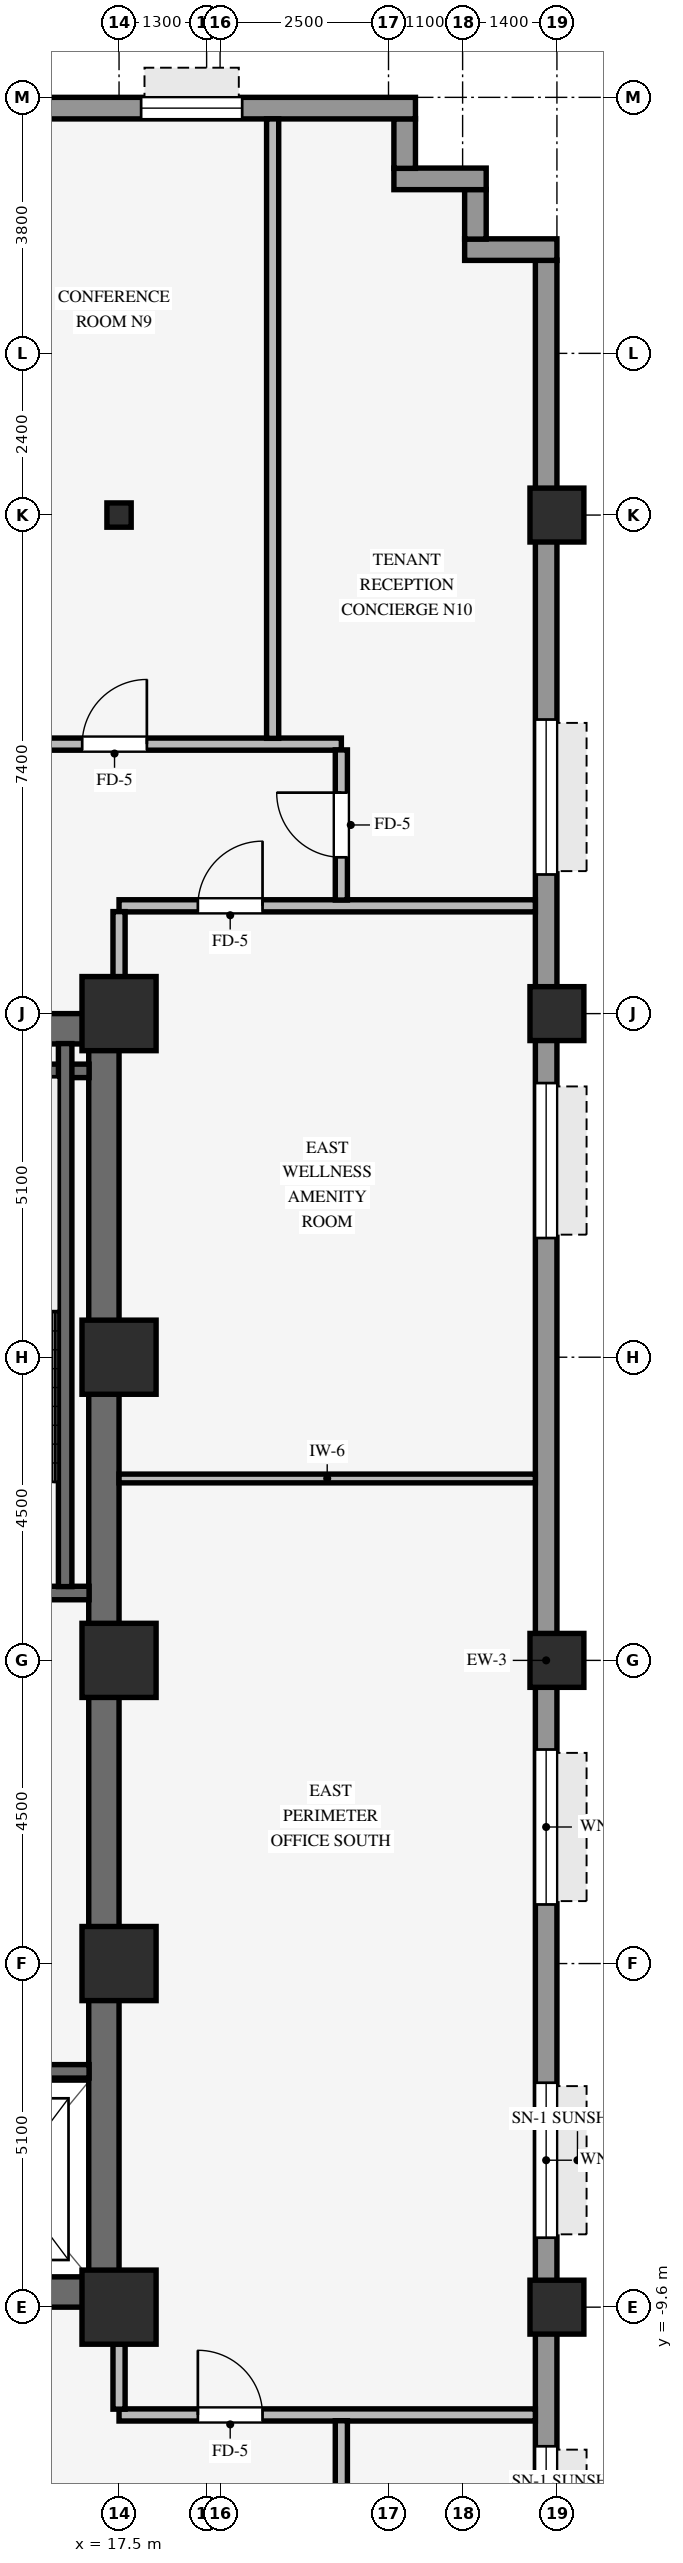
"""IFC4 building model, lengths in metres.
Left out: names, types, materials, properties, quantities, classifications, styles, units other than length and angle.
Written with IfcOpenShell. Run it as: python <this file> out.ifc"""

import sys

from ifc_helpers import new_model, si_unit, direction, frame, frame_2d, origin, origin_2d, place, context, subcontext, project, spatial, rectangle, hollow_rectangle, i_section, extrude, source, transform, mapped, element, fill, save


model = new_model("IFC4")
c1 = context("Model", 3, precision=1e-05, world=origin(), true_north=direction((0.0, 1.0)))
c2 = subcontext(c1, "Body", "Model", "MODEL_VIEW")
j1 = project(units=[si_unit("LENGTHUNIT", "METRE"), si_unit("PLANEANGLEUNIT", "RADIAN")], contexts=[c1])
p1 = place(None, origin())
s1 = spatial("IfcSite", under=j1, at=p1, CompositionType="ELEMENT")
p2 = place(p1, origin())
s2 = spatial("IfcBuilding", under=s1, at=p2, CompositionType="ELEMENT")
p3 = place(p2, frame((0.0, 0.0, 89.65)))
s3 = spatial("IfcBuildingStorey", under=s2, at=p3, CompositionType="ELEMENT", Elevation=89.65)
for number, where, z_axis, x_axis in (
    (1, (9.0, -9.375, 0.0), (0.0, 0.0, 1.0), (1.0, 0.0, 0.0)),
    (2, (9.0, 9.375, 0.0), (0.0, 0.0, 1.0), (1.0, 0.0, 0.0)),
):
    element("IfcWall", number, at=place(p3, frame(where, z_axis=z_axis, x_axis=x_axis)), inside=s3, PredefinedType="SHEAR", context=c2, shape_type="SweptSolid", body=[
        extrude(rectangle(XDim=8.5, YDim=0.45, at=frame_2d((4.25, 0.0))), origin(), (0.0, 0.0, 1.0), 3.25),
    ])
p4 = place(p3, frame((17.275, -9.155, 0.0), z_axis=(0.0, 0.0, 1.0), x_axis=(0.0, 1.0, 0.0)))
e3 = element("IfcWall", 3, at=p4, inside=s3, PredefinedType="SHEAR", context=c2, shape_type="SweptSolid", body=[
    extrude(rectangle(XDim=18.31, YDim=0.45, at=frame_2d((9.155, 0.0))), origin(), (0.0, 0.0, 1.0), 3.25),
])
for number, where, z_axis, x_axis in (
    (4, (17.5, -9.6, 0.0), (0.0, 0.0, 1.0), (1.0, 0.0, 0.0)),
    (5, (17.5, -4.5, 0.0), (0.0, 0.0, 1.0), (1.0, 0.0, 0.0)),
    (6, (17.5, 4.5, 0.0), (0.0, 0.0, 1.0), (1.0, 0.0, 0.0)),
    (7, (17.5, 9.6, 0.0), (0.0, 0.0, 1.0), (1.0, 0.0, 0.0)),
    (8, (17.5, 0.0, 0.0), (0.0, 0.0, 1.0), (1.0, 0.0, 0.0)),
):
    element("IfcColumn", number, at=place(p3, frame(where, z_axis=z_axis, x_axis=x_axis)), inside=s3, PredefinedType="COLUMN", context=c2, shape_type="SweptSolid", body=[
        extrude(rectangle(XDim=1.1, YDim=1.1, at=origin_2d()), origin(), (0.0, 0.0, 1.0), 3.25),
    ])
for number, where, z_axis, x_axis in (
    (9, (24.0, -9.6, 0.0), (0.0, 0.0, 1.0), (1.0, 0.0, 0.0)),
    (10, (24.0, 0.0, 0.0), (0.0, 0.0, 1.0), (1.0, 0.0, 0.0)),
    (11, (24.0, 9.6, 0.0), (0.0, 0.0, 1.0), (1.0, 0.0, 0.0)),
    (12, (24.0, 17.0, 0.0), (0.0, 0.0, 1.0), (1.0, 0.0, 0.0)),
):
    element("IfcColumn", number, at=place(p3, frame(where, z_axis=z_axis, x_axis=x_axis)), inside=s3, PredefinedType="COLUMN", context=c2, shape_type="SweptSolid", body=[
        extrude(hollow_rectangle(XDim=0.8, YDim=0.8, WallThickness=0.055, InnerFilletRadius=0.055, OuterFilletRadius=0.11, at=origin_2d()), origin(), (0.0, 0.0, 1.0), 3.25),
    ])
p5 = place(p3, frame((17.5, 17.0, 0.0), z_axis=(0.0, 0.0, 1.0), x_axis=(1.0, 0.0, 0.0)))
e13 = element("IfcColumn", 13, at=p5, inside=s3, PredefinedType="COLUMN", context=c2, shape_type="SweptSolid", body=[
    extrude(i_section(OverallWidth=0.36, OverallDepth=0.36, WebThickness=0.021, FlangeThickness=0.021, FilletRadius=0.018, at=origin_2d()), origin(), (0.0, 0.0, 1.0), 3.25),
])
p6 = place(p3, frame((23.84, -20.784, 0.0), z_axis=(0.0, 0.0, 1.0), x_axis=(0.0, 1.0, 0.0)))
e14 = element("IfcWall", 14, at=p6, inside=s3, PredefinedType="STANDARD", context=c2, shape_type="SweptSolid", body=[
    extrude(rectangle(XDim=41.568, YDim=0.32, at=frame_2d((20.784, 0.0))), origin(), (0.0, 0.0, 1.0), 2.585),
])
p7 = place(p6, frame((6.819, 0.0, 0.8)))
e15 = element("IfcOpeningElement", 15, at=p7, cuts=e14, PredefinedType="OPENING", context=c2, shape_type="SweptSolid", body=[
    extrude(rectangle(XDim=2.3, YDim=1.62, at=frame_2d((1.15, 0.81))), frame((0.0, 0.17, 0.0), z_axis=(0.0, -1.0, 0.0), x_axis=(1.0, 0.0, 0.0)), (0.0, 0.0, 1.0), 0.34),
])
p8 = place(p6, frame((12.215, 0.0, 0.8)))
e16 = element("IfcOpeningElement", 16, at=p8, cuts=e14, PredefinedType="OPENING", context=c2, shape_type="SweptSolid", body=[
    extrude(rectangle(XDim=2.3, YDim=1.62, at=frame_2d((1.15, 0.81))), frame((0.0, 0.17, 0.0), z_axis=(0.0, -1.0, 0.0), x_axis=(1.0, 0.0, 0.0)), (0.0, 0.0, 1.0), 0.34),
])
p9 = place(p6, frame((17.161, 0.0, 0.8)))
e17 = element("IfcOpeningElement", 17, at=p9, cuts=e14, PredefinedType="OPENING", context=c2, shape_type="SweptSolid", body=[
    extrude(rectangle(XDim=2.3, YDim=1.62, at=frame_2d((1.15, 0.81))), frame((0.0, 0.17, 0.0), z_axis=(0.0, -1.0, 0.0), x_axis=(1.0, 0.0, 0.0)), (0.0, 0.0, 1.0), 0.34),
])
p10 = place(p6, frame((27.053, 0.0, 0.8)))
e18 = element("IfcOpeningElement", 18, at=p10, cuts=e14, PredefinedType="OPENING", context=c2, shape_type="SweptSolid", body=[
    extrude(rectangle(XDim=2.3, YDim=1.62, at=frame_2d((1.15, 0.81))), frame((0.0, 0.17, 0.0), z_axis=(0.0, -1.0, 0.0), x_axis=(1.0, 0.0, 0.0)), (0.0, 0.0, 1.0), 0.34),
])
p11 = place(p6, frame((32.449, 0.0, 0.8)))
e19 = element("IfcOpeningElement", 19, at=p11, cuts=e14, PredefinedType="OPENING", context=c2, shape_type="SweptSolid", body=[
    extrude(rectangle(XDim=2.3, YDim=1.62, at=frame_2d((1.15, 0.81))), frame((0.0, 0.17, 0.0), z_axis=(0.0, -1.0, 0.0), x_axis=(1.0, 0.0, 0.0)), (0.0, 0.0, 1.0), 0.34),
])
p12 = place(p3, frame((22.63, 20.94, 0.0), z_axis=(0.0, 0.0, 1.0), x_axis=(1.0, 0.0, 0.0)))
e20 = element("IfcWall", 20, at=p12, inside=s3, PredefinedType="STANDARD", context=c2, shape_type="SweptSolid", body=[
    extrude(rectangle(XDim=1.37, YDim=0.32, at=frame_2d((0.685, 0.0))), origin(), (0.0, 0.0, 1.0), 3.24),
])
p13 = place(p3, frame((22.79, 21.096, 0.0), z_axis=(0.0, 0.0, 1.0), x_axis=(0.0, 1.0, 0.0)))
e21 = element("IfcWall", 21, at=p13, inside=s3, PredefinedType="STANDARD", context=c2, shape_type="SweptSolid", body=[
    extrude(rectangle(XDim=0.738, YDim=0.32, at=frame_2d((0.369, 0.0))), origin(), (0.0, 0.0, 1.0), 3.24),
])
p14 = place(p3, frame((21.58, 21.99, 0.0), z_axis=(0.0, 0.0, 1.0), x_axis=(1.0, 0.0, 0.0)))
e22 = element("IfcWall", 22, at=p14, inside=s3, PredefinedType="STANDARD", context=c2, shape_type="SweptSolid", body=[
    extrude(rectangle(XDim=1.37, YDim=0.32, at=frame_2d((0.685, 0.0))), origin(), (0.0, 0.0, 1.0), 3.24),
])
p15 = place(p3, frame((21.74, 22.146, 0.0), z_axis=(0.0, 0.0, 1.0), x_axis=(0.0, 1.0, 0.0)))
e23 = element("IfcWall", 23, at=p15, inside=s3, PredefinedType="STANDARD", context=c2, shape_type="SweptSolid", body=[
    extrude(rectangle(XDim=0.738, YDim=0.32, at=frame_2d((0.369, 0.0))), origin(), (0.0, 0.0, 1.0), 3.24),
])
p16 = place(p3, frame((-21.9, 23.04, 0.0), z_axis=(0.0, 0.0, 1.0), x_axis=(1.0, 0.0, 0.0)))
e24 = element("IfcWall", 24, at=p16, inside=s3, PredefinedType="STANDARD", context=c2, shape_type="SweptSolid", body=[
    extrude(rectangle(XDim=43.8, YDim=0.32, at=frame_2d((21.9, 0.0))), origin(), (0.0, 0.0, 1.0), 2.585),
])
p17 = place(p16, frame((1.672, 0.0, 0.8)))
e25 = element("IfcOpeningElement", 25, at=p17, cuts=e24, PredefinedType="OPENING", context=c2, shape_type="SweptSolid", body=[
    extrude(rectangle(XDim=1.5, YDim=1.6, at=frame_2d((0.75, 0.8))), frame((0.0, 0.17, 0.0), z_axis=(0.0, -1.0, 0.0), x_axis=(1.0, 0.0, 0.0)), (0.0, 0.0, 1.0), 0.34),
])
p18 = place(p16, frame((6.317, 0.0, 0.8)))
e26 = element("IfcOpeningElement", 26, at=p18, cuts=e24, PredefinedType="OPENING", context=c2, shape_type="SweptSolid", body=[
    extrude(rectangle(XDim=1.5, YDim=1.6, at=frame_2d((0.75, 0.8))), frame((0.0, 0.17, 0.0), z_axis=(0.0, -1.0, 0.0), x_axis=(1.0, 0.0, 0.0)), (0.0, 0.0, 1.0), 0.34),
])
p19 = place(p16, frame((17.856, 0.0, 0.8)))
e27 = element("IfcOpeningElement", 27, at=p19, cuts=e24, PredefinedType="OPENING", context=c2, shape_type="SweptSolid", body=[
    extrude(rectangle(XDim=1.5, YDim=1.6, at=frame_2d((0.75, 0.8))), frame((0.0, 0.17, 0.0), z_axis=(0.0, -1.0, 0.0), x_axis=(1.0, 0.0, 0.0)), (0.0, 0.0, 1.0), 0.34),
])
p20 = place(p16, frame((24.894, 0.0, 0.8)))
e28 = element("IfcOpeningElement", 28, at=p20, cuts=e24, PredefinedType="OPENING", context=c2, shape_type="SweptSolid", body=[
    extrude(rectangle(XDim=1.5, YDim=1.6, at=frame_2d((0.75, 0.8))), frame((0.0, 0.17, 0.0), z_axis=(0.0, -1.0, 0.0), x_axis=(1.0, 0.0, 0.0)), (0.0, 0.0, 1.0), 0.34),
])
p21 = place(p16, frame((35.083, 0.0, 0.8)))
e29 = element("IfcOpeningElement", 29, at=p21, cuts=e24, PredefinedType="OPENING", context=c2, shape_type="SweptSolid", body=[
    extrude(rectangle(XDim=1.5, YDim=1.6, at=frame_2d((0.75, 0.8))), frame((0.0, 0.17, 0.0), z_axis=(0.0, -1.0, 0.0), x_axis=(1.0, 0.0, 0.0)), (0.0, 0.0, 1.0), 0.34),
])
p22 = place(p16, frame((39.728, 0.0, 0.8)))
e30 = element("IfcOpeningElement", 30, at=p22, cuts=e24, PredefinedType="OPENING", context=c2, shape_type="SweptSolid", body=[
    extrude(rectangle(XDim=1.5, YDim=1.6, at=frame_2d((0.75, 0.8))), frame((0.0, 0.17, 0.0), z_axis=(0.0, -1.0, 0.0), x_axis=(1.0, 0.0, 0.0)), (0.0, 0.0, 1.0), 0.34),
])
for number, where, z_axis, x_axis in (
    (31, (13.535, 1.0, 0.0), (0.0, 0.0, 1.0), (1.0, 0.0, 0.0)),
    (32, (13.535, 8.75, 0.0), (0.0, 0.0, 1.0), (1.0, 0.0, 0.0)),
):
    element("IfcWall", number, at=place(p3, frame(where, z_axis=z_axis, x_axis=x_axis)), inside=s3, PredefinedType="SHEAR", context=c2, shape_type="SweptSolid", body=[
        extrude(rectangle(XDim=3.52, YDim=0.2, at=frame_2d((1.76, 0.0))), origin(), (0.0, 0.0, 1.0), 3.25),
    ])
p23 = place(p3, frame((16.7, 1.095, 0.0), z_axis=(0.0, 0.0, 1.0), x_axis=(0.0, 1.0, 0.0)))
e33 = element("IfcWall", 33, at=p23, inside=s3, PredefinedType="SHEAR", context=c2, shape_type="SweptSolid", body=[
    extrude(rectangle(XDim=8.06, YDim=0.2, at=frame_2d((4.03, 0.0))), origin(), (0.0, 0.0, 1.0), 3.25),
])
p24 = place(p3, frame((14.645, -6.1, 0.0), z_axis=(0.0, 0.0, 1.0), x_axis=(1.0, 0.0, 0.0)))
e34 = element("IfcWall", 34, at=p24, inside=s3, PredefinedType="SHEAR", context=c2, shape_type="SweptSolid", body=[
    extrude(rectangle(XDim=2.41, YDim=0.2, at=frame_2d((1.205, 0.0))), origin(), (0.0, 0.0, 1.0), 3.25),
])
p25 = place(p3, frame((17.5, -11.2, 0.0), z_axis=(0.0, 0.0, 1.0), x_axis=(1.0, 0.0, 0.0)))
e35 = element("IfcWall", 35, at=p25, inside=s3, PredefinedType="PARTITIONING", context=c2, shape_type="SweptSolid", body=[
    extrude(rectangle(XDim=6.18, YDim=0.18, at=frame_2d((3.09, 0.0))), origin(), (0.0, 0.0, 1.0), 3.24),
])
p26 = place(p25, frame((1.17, 0.0, 0.0)))
e36 = element("IfcOpeningElement", 36, at=p26, cuts=e35, PredefinedType="OPENING", context=c2, shape_type="SweptSolid", body=[
    extrude(rectangle(XDim=0.96, YDim=2.1, at=frame_2d((0.48, 1.05))), frame((0.0, 0.1, 0.0), z_axis=(0.0, -1.0, 0.0), x_axis=(1.0, 0.0, 0.0)), (0.0, 0.0, 1.0), 0.2),
])
p27 = place(p3, frame((17.5, 2.7, 0.0), z_axis=(0.0, 0.0, 1.0), x_axis=(1.0, 0.0, 0.0)))
e37 = element("IfcWall", 37, at=p27, inside=s3, PredefinedType="PARTITIONING", context=c2, shape_type="SweptSolid", body=[
    extrude(rectangle(XDim=6.18, YDim=0.13, at=frame_2d((3.09, 0.0))), origin(), (0.0, 0.0, 1.0), 3.24),
])
p28 = place(p3, frame((17.5, 11.2, 0.0), z_axis=(0.0, 0.0, 1.0), x_axis=(1.0, 0.0, 0.0)))
e38 = element("IfcWall", 38, at=p28, inside=s3, PredefinedType="PARTITIONING", context=c2, shape_type="SweptSolid", body=[
    extrude(rectangle(XDim=6.18, YDim=0.18, at=frame_2d((3.09, 0.0))), origin(), (0.0, 0.0, 1.0), 3.24),
])
p29 = place(p28, frame((1.17, 0.0, 0.0)))
e39 = element("IfcOpeningElement", 39, at=p29, cuts=e38, PredefinedType="OPENING", context=c2, shape_type="SweptSolid", body=[
    extrude(rectangle(XDim=0.96, YDim=2.1, at=frame_2d((0.48, 1.05))), frame((0.0, 0.1, 0.0), z_axis=(0.0, -1.0, 0.0), x_axis=(1.0, 0.0, 0.0)), (0.0, 0.0, 1.0), 0.2),
])
p30 = place(p3, frame((15.086, 13.6, 0.0), z_axis=(0.0, 0.0, 1.0), x_axis=(1.0, 0.0, 0.0)))
e40 = element("IfcWall", 40, at=p30, inside=s3, PredefinedType="PARTITIONING", context=c2, shape_type="SweptSolid", body=[
    extrude(rectangle(XDim=5.714, YDim=0.18, at=frame_2d((2.857, 0.0))), origin(), (0.0, 0.0, 1.0), 2.878),
])
p31 = place(p30, frame((1.867, 0.0, 0.0)))
e41 = element("IfcOpeningElement", 41, at=p31, cuts=e40, PredefinedType="OPENING", context=c2, shape_type="SweptSolid", body=[
    extrude(rectangle(XDim=0.96, YDim=2.1, at=frame_2d((0.48, 1.05))), frame((0.0, 0.1, 0.0), z_axis=(0.0, -1.0, 0.0), x_axis=(1.0, 0.0, 0.0)), (0.0, 0.0, 1.0), 0.2),
])
for number, where, z_axis, x_axis in (
    (42, (17.5, -11.114, 0.0), (0.0, 0.0, 1.0), (0.0, 1.0, 0.0)),
    (43, (17.5, 10.146, 0.0), (0.0, 0.0, 1.0), (0.0, 1.0, 0.0)),
):
    element("IfcWall", number, at=place(p3, frame(where, z_axis=z_axis, x_axis=x_axis)), inside=s3, PredefinedType="PARTITIONING", context=c2, shape_type="SweptSolid", body=[
        extrude(rectangle(XDim=0.968, YDim=0.18, at=frame_2d((0.484, 0.0))), origin(), (0.0, 0.0, 1.0), 2.335),
    ])
p32 = place(p3, frame((19.78, 13.686, 0.0), z_axis=(0.0, 0.0, 1.0), x_axis=(0.0, 1.0, 0.0)))
e44 = element("IfcWall", 44, at=p32, inside=s3, PredefinedType="PARTITIONING", context=c2, shape_type="SweptSolid", body=[
    extrude(rectangle(XDim=9.194, YDim=0.18, at=frame_2d((4.597, 0.0))), origin(), (0.0, 0.0, 1.0), 3.24),
])
p33 = place(p3, frame((20.8, -13.514, 0.0), z_axis=(0.0, 0.0, 1.0), x_axis=(0.0, 1.0, 0.0)))
e45 = element("IfcWall", 45, at=p33, inside=s3, PredefinedType="PARTITIONING", context=c2, shape_type="SweptSolid", body=[
    extrude(rectangle(XDim=2.228, YDim=0.18, at=frame_2d((1.114, 0.0))), origin(), (0.0, 0.0, 1.0), 3.24),
])
p34 = place(p3, frame((20.8, 11.286, 0.0), z_axis=(0.0, 0.0, 1.0), x_axis=(0.0, 1.0, 0.0)))
e46 = element("IfcWall", 46, at=p34, inside=s3, PredefinedType="PARTITIONING", context=c2, shape_type="SweptSolid", body=[
    extrude(rectangle(XDim=2.228, YDim=0.18, at=frame_2d((1.114, 0.0))), origin(), (0.0, 0.0, 1.0), 3.24),
])
p35 = place(p34, frame((0.634, 0.0, 0.0)))
e47 = element("IfcOpeningElement", 47, at=p35, cuts=e46, PredefinedType="OPENING", context=c2, shape_type="SweptSolid", body=[
    extrude(rectangle(XDim=0.96, YDim=2.1, at=frame_2d((0.48, 1.05))), frame((0.0, 0.1, 0.0), z_axis=(0.0, -1.0, 0.0), x_axis=(1.0, 0.0, 0.0)), (0.0, 0.0, 1.0), 0.2),
])
m1 = source(origin(), c2, "Body", "SweptSolid", [
    extrude(rectangle(XDim=2.3, YDim=1.62, at=frame_2d((1.15, 0.81))), frame((0.0, 0.03, 0.0), z_axis=(0.0, -1.0, 0.0), x_axis=(1.0, 0.0, 0.0)), (0.0, 0.0, 1.0), 0.06),
])
p36 = place(p7, origin())
e48 = element("IfcWindow", 48, at=p36, inside=s3, PartitioningType="SINGLE_PANEL", PredefinedType="WINDOW", context=c2, shape_type="MappedRepresentation", body=[
    mapped(m1, transform((0.0, 0.0, 0.0), scale=1.0)),
])
fill(e15, e48)
p37 = place(p8, origin())
e49 = element("IfcWindow", 49, at=p37, inside=s3, PartitioningType="SINGLE_PANEL", PredefinedType="WINDOW", context=c2, shape_type="MappedRepresentation", body=[
    mapped(m1, transform((0.0, 0.0, 0.0), scale=1.0)),
])
fill(e16, e49)
p38 = place(p9, origin())
e50 = element("IfcWindow", 50, at=p38, inside=s3, PartitioningType="SINGLE_PANEL", PredefinedType="WINDOW", context=c2, shape_type="MappedRepresentation", body=[
    mapped(m1, transform((0.0, 0.0, 0.0), scale=1.0)),
])
fill(e17, e50)
p39 = place(p10, origin())
e51 = element("IfcWindow", 51, at=p39, inside=s3, PartitioningType="SINGLE_PANEL", PredefinedType="WINDOW", context=c2, shape_type="MappedRepresentation", body=[
    mapped(m1, transform((0.0, 0.0, 0.0), scale=1.0)),
])
fill(e18, e51)
p40 = place(p11, origin())
e52 = element("IfcWindow", 52, at=p40, inside=s3, PartitioningType="SINGLE_PANEL", PredefinedType="WINDOW", context=c2, shape_type="MappedRepresentation", body=[
    mapped(m1, transform((0.0, 0.0, 0.0), scale=1.0)),
])
fill(e19, e52)
m2 = source(origin(), c2, "Body", "SweptSolid", [
    extrude(rectangle(XDim=1.5, YDim=1.6, at=frame_2d((0.75, 0.8))), frame((0.0, 0.03, 0.0), z_axis=(0.0, -1.0, 0.0), x_axis=(1.0, 0.0, 0.0)), (0.0, 0.0, 1.0), 0.06),
])
p41 = place(p22, origin())
e53 = element("IfcWindow", 53, at=p41, inside=s3, PartitioningType="SINGLE_PANEL", PredefinedType="WINDOW", context=c2, shape_type="MappedRepresentation", body=[
    mapped(m2, transform((0.0, 0.0, 0.0), scale=1.0)),
])
fill(e30, e53)
m3 = source(origin(), c2, "Body", "SweptSolid", [
    extrude(rectangle(XDim=0.96, YDim=2.1, at=frame_2d((0.48, 1.05))), frame((0.0, 0.025, 0.0), z_axis=(0.0, -1.0, 0.0), x_axis=(1.0, 0.0, 0.0)), (0.0, 0.0, 1.0), 0.05),
])
p42 = place(p31, origin())
e54 = element("IfcDoor", 54, at=p42, inside=s3, OperationType="SINGLE_SWING_RIGHT", PredefinedType="DOOR", context=c2, shape_type="MappedRepresentation", body=[
    mapped(m3, transform((0.0, 0.0, 0.0), scale=1.0)),
])
fill(e41, e54)
p43 = place(p26, origin())
e55 = element("IfcDoor", 55, at=p43, inside=s3, OperationType="SINGLE_SWING_LEFT", PredefinedType="DOOR", context=c2, shape_type="MappedRepresentation", body=[
    mapped(m3, transform((0.0, 0.0, 0.0), scale=1.0)),
])
fill(e36, e55)
p44 = place(p29, origin())
e56 = element("IfcDoor", 56, at=p44, inside=s3, OperationType="SINGLE_SWING_RIGHT", PredefinedType="DOOR", context=c2, shape_type="MappedRepresentation", body=[
    mapped(m3, transform((0.0, 0.0, 0.0), scale=1.0)),
])
fill(e39, e56)
p45 = place(p35, origin())
e57 = element("IfcDoor", 57, at=p45, inside=s3, OperationType="SINGLE_SWING_RIGHT", PredefinedType="DOOR", context=c2, shape_type="MappedRepresentation", body=[
    mapped(m3, transform((0.0, 0.0, 0.0), scale=1.0)),
])
fill(e47, e57)
save(model, sys.argv[1])
